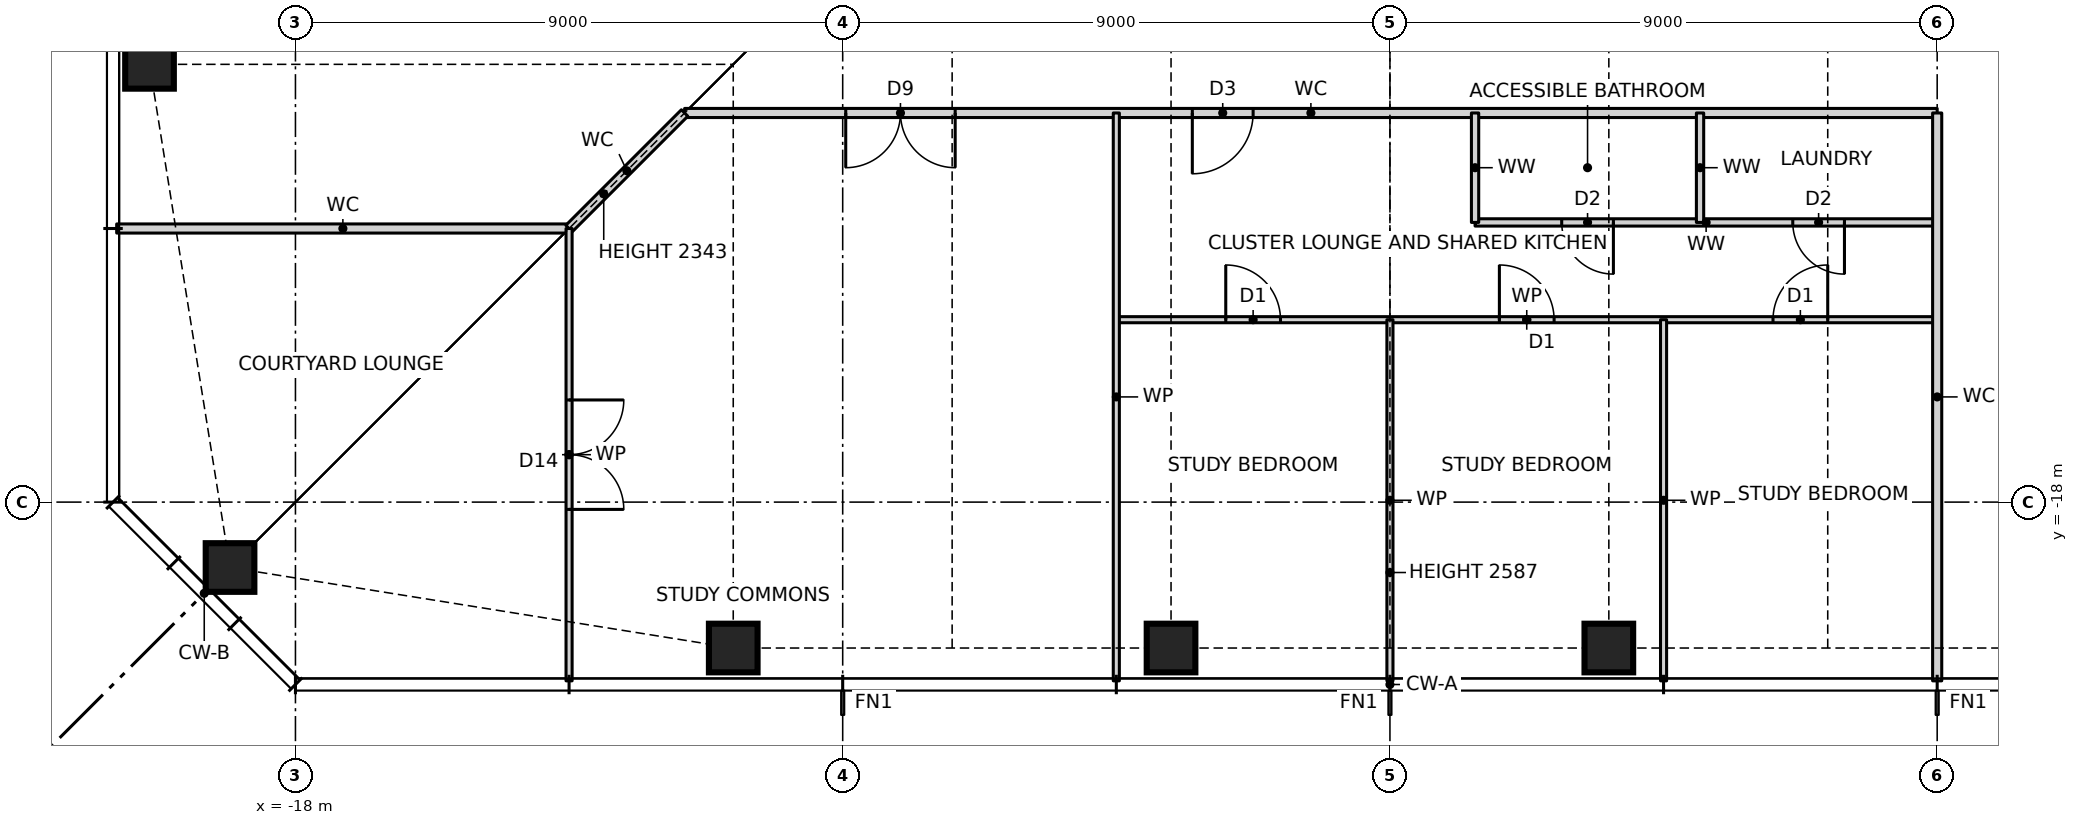
"""IFC4 building model, lengths in metres.
Left out: names, types, materials, properties, quantities, classifications, styles, units other than length and angle.
Written with IfcOpenShell. Run it as: python <this file> out.ifc"""

import sys

from ifc_helpers import new_model, si_unit, direction, frame, frame_2d, origin, origin_2d, place, context, subcontext, project, spatial, rectangle, hollow_rectangle, extrude, element, fill, save


model = new_model("IFC4")
c1 = context("Model", 3, precision=1e-05, world=origin(), true_north=direction((0.0, 1.0)))
c2 = subcontext(c1, "Body", "Model", "MODEL_VIEW")
j1 = project(units=[si_unit("LENGTHUNIT", "METRE"), si_unit("PLANEANGLEUNIT", "RADIAN")], contexts=[c1])
p1 = place(None, origin())
s1 = spatial("IfcSite", under=j1, at=p1, CompositionType="ELEMENT")
p2 = place(p1, origin())
s2 = spatial("IfcBuilding", under=s1, at=p2, CompositionType="ELEMENT")
p3 = place(p2, frame((0.0, 0.0, 105.0)))
s3 = spatial("IfcBuildingStorey", under=s2, at=p3, CompositionType="ELEMENT", Elevation=105.0)
for number, where, z_axis, x_axis in (
    (1, (-19.076, -19.076, 0.0), (0.0, 0.0, 1.0), (1.0, 0.0, 0.0)),
    (2, (-10.8, -20.4, 0.0), (0.0, 0.0, 1.0), (1.0, 0.0, 0.0)),
    (3, (-3.6, -20.4, 0.0), (0.0, 0.0, 1.0), (1.0, 0.0, 0.0)),
    (4, (3.6, -20.4, 0.0), (0.0, 0.0, 1.0), (1.0, 0.0, 0.0)),
    (5, (-20.4, -10.8, 0.0), (0.0, 0.0, 1.0), (1.0, 0.0, 0.0)),
):
    element("IfcColumn", number, at=place(p3, frame(where, z_axis=z_axis, x_axis=x_axis)), inside=s3, PredefinedType="COLUMN", context=c2, shape_type="SweptSolid", body=[
        extrude(hollow_rectangle(XDim=0.8, YDim=0.8, WallThickness=0.07, at=origin_2d()), origin(), (0.0, 0.0, 1.0), 3.5),
    ])
p4 = place(p3, frame((-4.5, -15.0, 0.0), z_axis=(0.0, 0.0, 1.0), x_axis=(1.0, 0.0, 0.0)))
e6 = element("IfcWall", 6, at=p4, inside=s3, PredefinedType="PARTITIONING", context=c2, shape_type="SweptSolid", body=[
    extrude(rectangle(XDim=13.5, YDim=0.1, at=frame_2d((6.75, 0.0))), origin(), (0.0, 0.0, 1.0), 3.27),
])
p5 = place(p4, frame((1.8, 0.0, 0.0)))
e7 = element("IfcOpeningElement", 7, at=p5, cuts=e6, PredefinedType="OPENING", context=c2, shape_type="SweptSolid", body=[
    extrude(rectangle(XDim=0.9, YDim=2.1, at=frame_2d((0.45, 1.05))), frame((0.0, 0.06, 0.0), z_axis=(0.0, -1.0, 0.0), x_axis=(1.0, 0.0, 0.0)), (0.0, 0.0, 1.0), 0.12),
])
p6 = place(p4, frame((6.3, 0.0, 0.0)))
e8 = element("IfcOpeningElement", 8, at=p6, cuts=e6, PredefinedType="OPENING", context=c2, shape_type="SweptSolid", body=[
    extrude(rectangle(XDim=0.9, YDim=2.1, at=frame_2d((0.45, 1.05))), frame((0.0, 0.06, 0.0), z_axis=(0.0, -1.0, 0.0), x_axis=(1.0, 0.0, 0.0)), (0.0, 0.0, 1.0), 0.12),
])
p7 = place(p4, frame((10.8, 0.0, 0.0)))
e9 = element("IfcOpeningElement", 9, at=p7, cuts=e6, PredefinedType="OPENING", context=c2, shape_type="SweptSolid", body=[
    extrude(rectangle(XDim=0.9, YDim=2.1, at=frame_2d((0.45, 1.05))), frame((0.0, 0.06, 0.0), z_axis=(0.0, -1.0, 0.0), x_axis=(1.0, 0.0, 0.0)), (0.0, 0.0, 1.0), 0.12),
])
p8 = place(p3, frame((-20.94, -13.5, 0.0), z_axis=(0.0, 0.0, 1.0), x_axis=(1.0, 0.0, 0.0)))
e10 = element("IfcWall", 10, at=p8, inside=s3, PredefinedType="PARTITIONING", context=c2, shape_type="SweptSolid", body=[
    extrude(rectangle(XDim=7.44, YDim=0.15, at=frame_2d((3.72, 0.0))), origin(), (0.0, 0.0, 1.0), 3.27),
])
p9 = place(p3, frame((1.4, -13.4, 0.0), z_axis=(0.0, 0.0, 1.0), x_axis=(1.0, 0.0, 0.0)))
e11 = element("IfcWall", 11, at=p9, inside=s3, PredefinedType="PARTITIONING", context=c2, shape_type="SweptSolid", body=[
    extrude(rectangle(XDim=7.6, YDim=0.12, at=frame_2d((3.8, 0.0))), origin(), (0.0, 0.0, 1.0), 3.27),
])
p10 = place(p9, frame((1.425, 0.0, 0.0)))
e12 = element("IfcOpeningElement", 12, at=p10, cuts=e11, PredefinedType="OPENING", context=c2, shape_type="SweptSolid", body=[
    extrude(rectangle(XDim=0.85, YDim=2.1, at=frame_2d((0.425, 1.05))), frame((0.0, 0.07, 0.0), z_axis=(0.0, -1.0, 0.0), x_axis=(1.0, 0.0, 0.0)), (0.0, 0.0, 1.0), 0.14),
])
p11 = place(p9, frame((5.225, 0.0, 0.0)))
e13 = element("IfcOpeningElement", 13, at=p11, cuts=e11, PredefinedType="OPENING", context=c2, shape_type="SweptSolid", body=[
    extrude(rectangle(XDim=0.85, YDim=2.1, at=frame_2d((0.425, 1.05))), frame((0.0, 0.07, 0.0), z_axis=(0.0, -1.0, 0.0), x_axis=(1.0, 0.0, 0.0)), (0.0, 0.0, 1.0), 0.14),
])
p12 = place(p3, frame((-11.6, -11.6, 0.0), z_axis=(0.0, 0.0, 1.0), x_axis=(1.0, 0.0, 0.0)))
e14 = element("IfcWall", 14, at=p12, inside=s3, PredefinedType="PARTITIONING", context=c2, shape_type="SweptSolid", body=[
    extrude(rectangle(XDim=20.6, YDim=0.15, at=frame_2d((10.3, 0.0))), origin(), (0.0, 0.0, 1.0), 3.27),
])
p13 = place(p12, frame((2.65, 0.0, 0.0)))
e15 = element("IfcOpeningElement", 15, at=p13, cuts=e14, PredefinedType="OPENING", context=c2, shape_type="SweptSolid", body=[
    extrude(rectangle(XDim=1.8, YDim=2.1, at=frame_2d((0.9, 1.05))), frame((0.0, 0.085, 0.0), z_axis=(0.0, -1.0, 0.0), x_axis=(1.0, 0.0, 0.0)), (0.0, 0.0, 1.0), 0.17),
])
p14 = place(p12, frame((8.35, 0.0, 0.0)))
e16 = element("IfcOpeningElement", 16, at=p14, cuts=e14, PredefinedType="OPENING", context=c2, shape_type="SweptSolid", body=[
    extrude(rectangle(XDim=1.0, YDim=2.1, at=frame_2d((0.5, 1.05))), frame((0.0, 0.085, 0.0), z_axis=(0.0, -1.0, 0.0), x_axis=(1.0, 0.0, 0.0)), (0.0, 0.0, 1.0), 0.17),
])
p15 = place(p3, frame((-13.5, -13.5, 0.0), z_axis=(0.0, 0.0, 1.0), x_axis=(0.707106781187, 0.707106781187, 0.0)))
e17 = element("IfcWall", 17, at=p15, inside=s3, PredefinedType="PARTITIONING", context=c2, shape_type="SweptSolid", body=[
    extrude(rectangle(XDim=2.687, YDim=0.15, at=frame_2d((1.343, 0.0))), origin(), (0.0, 0.0, 1.0), 2.343),
])
p16 = place(p3, frame((9.0, -20.94, 0.0), z_axis=(0.0, 0.0, 1.0), x_axis=(0.0, 1.0, 0.0)))
e18 = element("IfcWall", 18, at=p16, inside=s3, PredefinedType="PARTITIONING", context=c2, shape_type="SweptSolid", body=[
    extrude(rectangle(XDim=9.34, YDim=0.15, at=frame_2d((4.67, 0.0))), origin(), (0.0, 0.0, 1.0), 3.27),
])
p17 = place(p3, frame((5.1, -13.4, 0.0), z_axis=(0.0, 0.0, 1.0), x_axis=(0.0, 1.0, 0.0)))
e19 = element("IfcWall", 19, at=p17, inside=s3, PredefinedType="PARTITIONING", context=c2, shape_type="SweptSolid", body=[
    extrude(rectangle(XDim=1.8, YDim=0.12, at=frame_2d((0.9, 0.0))), origin(), (0.0, 0.0, 1.0), 3.27),
])
p18 = place(p3, frame((4.5, -20.94, 0.0), z_axis=(0.0, 0.0, 1.0), x_axis=(0.0, 1.0, 0.0)))
e20 = element("IfcWall", 20, at=p18, inside=s3, PredefinedType="PARTITIONING", context=c2, shape_type="SweptSolid", body=[
    extrude(rectangle(XDim=5.94, YDim=0.1, at=frame_2d((2.97, 0.0))), origin(), (0.0, 0.0, 1.0), 3.27),
])
p19 = place(p3, frame((1.4, -13.4, 0.0), z_axis=(0.0, 0.0, 1.0), x_axis=(0.0, 1.0, 0.0)))
e21 = element("IfcWall", 21, at=p19, inside=s3, PredefinedType="PARTITIONING", context=c2, shape_type="SweptSolid", body=[
    extrude(rectangle(XDim=1.8, YDim=0.12, at=frame_2d((0.9, 0.0))), origin(), (0.0, 0.0, 1.0), 3.27),
])
p20 = place(p3, frame((0.0, -20.94, 0.0), z_axis=(0.0, 0.0, 1.0), x_axis=(0.0, 1.0, 0.0)))
e22 = element("IfcWall", 22, at=p20, inside=s3, PredefinedType="PARTITIONING", context=c2, shape_type="SweptSolid", body=[
    extrude(rectangle(XDim=5.94, YDim=0.1, at=frame_2d((2.97, 0.0))), origin(), (0.0, 0.0, 1.0), 2.587),
])
p21 = place(p3, frame((-4.5, -20.94, 0.0), z_axis=(0.0, 0.0, 1.0), x_axis=(0.0, 1.0, 0.0)))
e23 = element("IfcWall", 23, at=p21, inside=s3, PredefinedType="PARTITIONING", context=c2, shape_type="SweptSolid", body=[
    extrude(rectangle(XDim=9.34, YDim=0.1, at=frame_2d((4.67, 0.0))), origin(), (0.0, 0.0, 1.0), 3.27),
])
p22 = place(p3, frame((-13.5, -20.94, 0.0), z_axis=(0.0, 0.0, 1.0), x_axis=(0.0, 1.0, 0.0)))
e24 = element("IfcWall", 24, at=p22, inside=s3, PredefinedType="PARTITIONING", context=c2, shape_type="SweptSolid", body=[
    extrude(rectangle(XDim=7.44, YDim=0.1, at=frame_2d((3.72, 0.0))), origin(), (0.0, 0.0, 1.0), 3.27),
])
p23 = place(p22, frame((2.82, 0.0, 0.0)))
e25 = element("IfcOpeningElement", 25, at=p23, cuts=e24, PredefinedType="OPENING", context=c2, shape_type="SweptSolid", body=[
    extrude(rectangle(XDim=1.8, YDim=2.1, at=frame_2d((0.9, 1.05))), frame((0.0, 0.06, 0.0), z_axis=(0.0, -1.0, 0.0), x_axis=(1.0, 0.0, 0.0)), (0.0, 0.0, 1.0), 0.12),
])
p24 = place(p13, frame((1.8, 0.0, 0.0), z_axis=(0.0, 0.0, 1.0), x_axis=(-1.0, 0.0, 0.0)))
e26 = element("IfcDoor", 26, at=p24, inside=s3, OperationType="DOUBLE_DOOR_SINGLE_SWING", PredefinedType="DOOR", context=c2, shape_type="SweptSolid", body=[
    extrude(rectangle(XDim=1.8, YDim=2.1, at=frame_2d((0.9, 1.05))), frame((0.0, 0.025, 0.0), z_axis=(0.0, -1.0, 0.0), x_axis=(1.0, 0.0, 0.0)), (0.0, 0.0, 1.0), 0.05),
])
fill(e15, e26)
p25 = place(p5, origin())
e27 = element("IfcDoor", 27, at=p25, inside=s3, OperationType="SINGLE_SWING_LEFT", PredefinedType="DOOR", context=c2, shape_type="SweptSolid", body=[
    extrude(rectangle(XDim=0.9, YDim=2.1, at=frame_2d((0.45, 1.05))), frame((0.0, 0.025, 0.0), z_axis=(0.0, -1.0, 0.0), x_axis=(1.0, 0.0, 0.0)), (0.0, 0.0, 1.0), 0.05),
])
fill(e7, e27)
p26 = place(p6, origin())
e28 = element("IfcDoor", 28, at=p26, inside=s3, OperationType="SINGLE_SWING_LEFT", PredefinedType="DOOR", context=c2, shape_type="SweptSolid", body=[
    extrude(rectangle(XDim=0.9, YDim=2.1, at=frame_2d((0.45, 1.05))), frame((0.0, 0.025, 0.0), z_axis=(0.0, -1.0, 0.0), x_axis=(1.0, 0.0, 0.0)), (0.0, 0.0, 1.0), 0.05),
])
fill(e8, e28)
p27 = place(p7, origin())
e29 = element("IfcDoor", 29, at=p27, inside=s3, OperationType="SINGLE_SWING_RIGHT", PredefinedType="DOOR", context=c2, shape_type="SweptSolid", body=[
    extrude(rectangle(XDim=0.9, YDim=2.1, at=frame_2d((0.45, 1.05))), frame((0.0, 0.025, 0.0), z_axis=(0.0, -1.0, 0.0), x_axis=(1.0, 0.0, 0.0)), (0.0, 0.0, 1.0), 0.05),
])
fill(e9, e29)
p28 = place(p14, frame((1.0, 0.0, 0.0), z_axis=(0.0, 0.0, 1.0), x_axis=(-1.0, 0.0, 0.0)))
e30 = element("IfcDoor", 30, at=p28, inside=s3, OperationType="SINGLE_SWING_RIGHT", PredefinedType="DOOR", context=c2, shape_type="SweptSolid", body=[
    extrude(rectangle(XDim=1.0, YDim=2.1, at=frame_2d((0.5, 1.05))), frame((0.0, 0.025, 0.0), z_axis=(0.0, -1.0, 0.0), x_axis=(1.0, 0.0, 0.0)), (0.0, 0.0, 1.0), 0.05),
])
fill(e16, e30)
p29 = place(p10, frame((0.85, 0.0, 0.0), z_axis=(0.0, 0.0, 1.0), x_axis=(-1.0, 0.0, 0.0)))
e31 = element("IfcDoor", 31, at=p29, inside=s3, OperationType="SINGLE_SWING_LEFT", PredefinedType="DOOR", context=c2, shape_type="SweptSolid", body=[
    extrude(rectangle(XDim=0.85, YDim=2.1, at=frame_2d((0.425, 1.05))), frame((0.0, 0.025, 0.0), z_axis=(0.0, -1.0, 0.0), x_axis=(1.0, 0.0, 0.0)), (0.0, 0.0, 1.0), 0.05),
])
fill(e12, e31)
p30 = place(p11, frame((0.85, 0.0, 0.0), z_axis=(0.0, 0.0, 1.0), x_axis=(-1.0, 0.0, 0.0)))
e32 = element("IfcDoor", 32, at=p30, inside=s3, OperationType="SINGLE_SWING_LEFT", PredefinedType="DOOR", context=c2, shape_type="SweptSolid", body=[
    extrude(rectangle(XDim=0.85, YDim=2.1, at=frame_2d((0.425, 1.05))), frame((0.0, 0.025, 0.0), z_axis=(0.0, -1.0, 0.0), x_axis=(1.0, 0.0, 0.0)), (0.0, 0.0, 1.0), 0.05),
])
fill(e13, e32)
p31 = place(p23, frame((1.8, 0.0, 0.0), z_axis=(0.0, 0.0, 1.0), x_axis=(-1.0, 0.0, 0.0)))
e33 = element("IfcDoor", 33, at=p31, inside=s3, OperationType="DOUBLE_DOOR_SINGLE_SWING", PredefinedType="DOOR", context=c2, shape_type="SweptSolid", body=[
    extrude(rectangle(XDim=1.8, YDim=2.1, at=frame_2d((0.9, 1.05))), frame((0.0, 0.025, 0.0), z_axis=(0.0, -1.0, 0.0), x_axis=(1.0, 0.0, 0.0)), (0.0, 0.0, 1.0), 0.05),
])
fill(e25, e33)
save(model, sys.argv[1])
